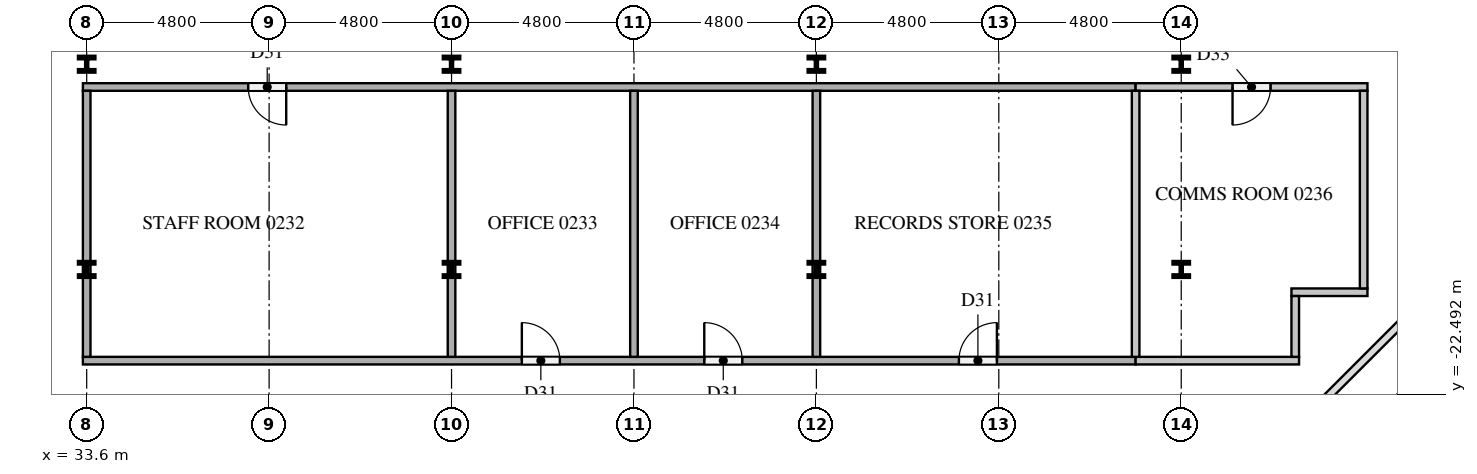
"""IFC4 building model, lengths in metres.
Left out: names, types, materials, properties, quantities, classifications, styles, units other than length and angle.
Written with IfcOpenShell. Run it as: python <this file> out.ifc"""

import sys

from ifc_helpers import new_model, si_unit, direction, frame, frame_2d, origin, origin_2d, place, context, subcontext, project, spatial, rectangle, i_section, extrude, element, fill, save


model = new_model("IFC4")
c1 = context("Model", 3, precision=1e-05, world=origin(), true_north=direction((0.0, 1.0)))
c2 = subcontext(c1, "Body", "Model", "MODEL_VIEW")
j1 = project(units=[si_unit("LENGTHUNIT", "METRE"), si_unit("PLANEANGLEUNIT", "RADIAN")], contexts=[c1])
p1 = place(None, origin())
s1 = spatial("IfcSite", under=j1, at=p1, CompositionType="ELEMENT")
p2 = place(p1, origin())
s2 = spatial("IfcBuilding", under=s1, at=p2, CompositionType="ELEMENT")
p3 = place(p2, frame((0.0, 0.0, 10.5)))
s3 = spatial("IfcBuildingStorey", under=s2, at=p3, CompositionType="ELEMENT", Elevation=10.5)
for number, where, z_axis, x_axis in (
    (1, (33.6, -19.2, 0.0), (0.0, 0.0, 1.0), (1.0, 0.0, 0.0)),
    (2, (33.6, -13.8, 0.0), (0.0, 0.0, 1.0), (1.0, 0.0, 0.0)),
    (3, (43.2, -19.2, 0.0), (0.0, 0.0, 1.0), (1.0, 0.0, 0.0)),
    (4, (43.2, -13.8, 0.0), (0.0, 0.0, 1.0), (1.0, 0.0, 0.0)),
    (5, (52.8, -19.2, 0.0), (0.0, 0.0, 1.0), (1.0, 0.0, 0.0)),
    (6, (52.8, -13.8, 0.0), (0.0, 0.0, 1.0), (1.0, 0.0, 0.0)),
    (7, (62.4, -19.2, 0.0), (0.0, 0.0, 1.0), (1.0, 0.0, 0.0)),
    (8, (62.4, -13.8, 0.0), (0.0, 0.0, 1.0), (1.0, 0.0, 0.0)),
):
    element("IfcColumn", number, at=place(p3, frame(where, z_axis=z_axis, x_axis=x_axis)), inside=s3, PredefinedType="COLUMN", context=c2, shape_type="SweptSolid", body=[
        extrude(i_section(OverallWidth=0.396, OverallDepth=0.381, WebThickness=0.019, FlangeThickness=0.03, at=origin_2d()), origin(), (0.0, 0.0, 1.0), 4.2),
    ])
p4 = place(p3, frame((33.5, -21.6, 0.0), z_axis=(0.0, 0.0, 1.0), x_axis=(1.0, 0.0, 0.0)))
e9 = element("IfcWall", 9, at=p4, inside=s3, PredefinedType="PARTITIONING", context=c2, shape_type="SweptSolid", body=[
    extrude(rectangle(XDim=27.7, YDim=0.2, at=frame_2d((13.85, 0.0))), origin(), (0.0, 0.0, 1.0), 4.2),
])
p5 = place(p4, frame((11.55, 0.0, 0.0)))
e10 = element("IfcOpeningElement", 10, at=p5, cuts=e9, PredefinedType="OPENING", context=c2, shape_type="SweptSolid", body=[
    extrude(rectangle(XDim=1.0, YDim=2.1, at=frame_2d((0.5, 1.05))), frame((0.0, 0.11, 0.0), z_axis=(0.0, -1.0, 0.0), x_axis=(1.0, 0.0, 0.0)), (0.0, 0.0, 1.0), 0.22),
])
p6 = place(p4, frame((16.35, 0.0, 0.0)))
e11 = element("IfcOpeningElement", 11, at=p6, cuts=e9, PredefinedType="OPENING", context=c2, shape_type="SweptSolid", body=[
    extrude(rectangle(XDim=1.0, YDim=2.1, at=frame_2d((0.5, 1.05))), frame((0.0, 0.11, 0.0), z_axis=(0.0, -1.0, 0.0), x_axis=(1.0, 0.0, 0.0)), (0.0, 0.0, 1.0), 0.22),
])
p7 = place(p4, frame((23.05, 0.0, 0.0)))
e12 = element("IfcOpeningElement", 12, at=p7, cuts=e9, PredefinedType="OPENING", context=c2, shape_type="SweptSolid", body=[
    extrude(rectangle(XDim=1.0, YDim=2.1, at=frame_2d((0.5, 1.05))), frame((0.0, 0.11, 0.0), z_axis=(0.0, -1.0, 0.0), x_axis=(1.0, 0.0, 0.0)), (0.0, 0.0, 1.0), 0.22),
])
p8 = place(p3, frame((61.2, -21.6, 0.0), z_axis=(0.0, 0.0, 1.0), x_axis=(1.0, 0.0, 0.0)))
e13 = element("IfcWall", 13, at=p8, inside=s3, PredefinedType="PARTITIONING", context=c2, shape_type="SweptSolid", body=[
    extrude(rectangle(XDim=4.3, YDim=0.2, at=frame_2d((2.15, 0.0))), origin(), (0.0, 0.0, 1.0), 4.2),
])
p9 = place(p3, frame((65.3, -19.8, 0.0), z_axis=(0.0, 0.0, 1.0), x_axis=(1.0, 0.0, 0.0)))
e14 = element("IfcWall", 14, at=p9, inside=s3, PredefinedType="PARTITIONING", context=c2, shape_type="SweptSolid", body=[
    extrude(rectangle(XDim=2.0, YDim=0.2, at=frame_2d((1.0, 0.0))), origin(), (0.0, 0.0, 1.0), 4.2),
])
p10 = place(p3, frame((61.2, -14.4, 0.0), z_axis=(0.0, 0.0, 1.0), x_axis=(-1.0, 0.0, 0.0)))
e15 = element("IfcWall", 15, at=p10, inside=s3, PredefinedType="PARTITIONING", context=c2, shape_type="SweptSolid", body=[
    extrude(rectangle(XDim=27.7, YDim=0.2, at=frame_2d((13.85, 0.0))), origin(), (0.0, 0.0, 1.0), 4.2),
])
p11 = place(p10, frame((22.35, 0.0, 0.0)))
e16 = element("IfcOpeningElement", 16, at=p11, cuts=e15, PredefinedType="OPENING", context=c2, shape_type="SweptSolid", body=[
    extrude(rectangle(XDim=1.0, YDim=2.1, at=frame_2d((0.5, 1.05))), frame((0.0, 0.11, 0.0), z_axis=(0.0, -1.0, 0.0), x_axis=(1.0, 0.0, 0.0)), (0.0, 0.0, 1.0), 0.22),
])
p12 = place(p3, frame((67.3, -14.4, 0.0), z_axis=(0.0, 0.0, 1.0), x_axis=(-1.0, 0.0, 0.0)))
e17 = element("IfcWall", 17, at=p12, inside=s3, PredefinedType="PARTITIONING", context=c2, shape_type="SweptSolid", body=[
    extrude(rectangle(XDim=6.1, YDim=0.2, at=frame_2d((3.05, 0.0))), origin(), (0.0, 0.0, 1.0), 4.2),
])
p13 = place(p12, frame((2.55, 0.0, 0.0)))
e18 = element("IfcOpeningElement", 18, at=p13, cuts=e17, PredefinedType="OPENING", context=c2, shape_type="SweptSolid", body=[
    extrude(rectangle(XDim=1.0, YDim=2.1, at=frame_2d((0.5, 1.05))), frame((0.0, 0.11, 0.0), z_axis=(0.0, -1.0, 0.0), x_axis=(1.0, 0.0, 0.0)), (0.0, 0.0, 1.0), 0.22),
])
for number, where, z_axis, x_axis in (
    (19, (33.6, -21.5, 0.0), (0.0, 0.0, 1.0), (0.0, 1.0, 0.0)),
    (20, (43.2, -21.5, 0.0), (0.0, 0.0, 1.0), (0.0, 1.0, 0.0)),
    (21, (48.0, -21.5, 0.0), (0.0, 0.0, 1.0), (0.0, 1.0, 0.0)),
    (22, (52.8, -21.5, 0.0), (0.0, 0.0, 1.0), (0.0, 1.0, 0.0)),
    (23, (61.2, -21.5, 0.0), (0.0, 0.0, 1.0), (0.0, 1.0, 0.0)),
):
    element("IfcWall", number, at=place(p3, frame(where, z_axis=z_axis, x_axis=x_axis)), inside=s3, PredefinedType="PARTITIONING", context=c2, shape_type="SweptSolid", body=[
        extrude(rectangle(XDim=7.0, YDim=0.2, at=frame_2d((3.5, 0.0))), origin(), (0.0, 0.0, 1.0), 4.2),
    ])
p14 = place(p3, frame((65.4, -21.5, 0.0), z_axis=(0.0, 0.0, 1.0), x_axis=(0.0, 1.0, 0.0)))
e24 = element("IfcWall", 24, at=p14, inside=s3, PredefinedType="PARTITIONING", context=c2, shape_type="SweptSolid", body=[
    extrude(rectangle(XDim=1.6, YDim=0.2, at=frame_2d((0.8, 0.0))), origin(), (0.0, 0.0, 1.0), 4.2),
])
p15 = place(p3, frame((67.2, -19.7, 0.0), z_axis=(0.0, 0.0, 1.0), x_axis=(0.0, 1.0, 0.0)))
e25 = element("IfcWall", 25, at=p15, inside=s3, PredefinedType="PARTITIONING", context=c2, shape_type="SweptSolid", body=[
    extrude(rectangle(XDim=5.2, YDim=0.2, at=frame_2d((2.6, 0.0))), origin(), (0.0, 0.0, 1.0), 4.2),
])
p16 = place(p11, origin())
e26 = element("IfcDoor", 26, at=p16, inside=s3, OperationType="SINGLE_SWING_LEFT", PredefinedType="DOOR", context=c2, shape_type="SweptSolid", body=[
    extrude(rectangle(XDim=1.0, YDim=2.1, at=frame_2d((0.5, 1.05))), frame((0.0, 0.025, 0.0), z_axis=(0.0, -1.0, 0.0), x_axis=(1.0, 0.0, 0.0)), (0.0, 0.0, 1.0), 0.05),
])
fill(e16, e26)
p17 = place(p5, origin())
e27 = element("IfcDoor", 27, at=p17, inside=s3, OperationType="SINGLE_SWING_LEFT", PredefinedType="DOOR", context=c2, shape_type="SweptSolid", body=[
    extrude(rectangle(XDim=1.0, YDim=2.1, at=frame_2d((0.5, 1.05))), frame((0.0, 0.025, 0.0), z_axis=(0.0, -1.0, 0.0), x_axis=(1.0, 0.0, 0.0)), (0.0, 0.0, 1.0), 0.05),
])
fill(e10, e27)
p18 = place(p6, origin())
e28 = element("IfcDoor", 28, at=p18, inside=s3, OperationType="SINGLE_SWING_LEFT", PredefinedType="DOOR", context=c2, shape_type="SweptSolid", body=[
    extrude(rectangle(XDim=1.0, YDim=2.1, at=frame_2d((0.5, 1.05))), frame((0.0, 0.025, 0.0), z_axis=(0.0, -1.0, 0.0), x_axis=(1.0, 0.0, 0.0)), (0.0, 0.0, 1.0), 0.05),
])
fill(e11, e28)
p19 = place(p7, origin())
e29 = element("IfcDoor", 29, at=p19, inside=s3, OperationType="SINGLE_SWING_RIGHT", PredefinedType="DOOR", context=c2, shape_type="SweptSolid", body=[
    extrude(rectangle(XDim=1.0, YDim=2.1, at=frame_2d((0.5, 1.05))), frame((0.0, 0.025, 0.0), z_axis=(0.0, -1.0, 0.0), x_axis=(1.0, 0.0, 0.0)), (0.0, 0.0, 1.0), 0.05),
])
fill(e12, e29)
p20 = place(p13, origin())
e30 = element("IfcDoor", 30, at=p20, inside=s3, OperationType="SINGLE_SWING_RIGHT", PredefinedType="DOOR", context=c2, shape_type="SweptSolid", body=[
    extrude(rectangle(XDim=1.0, YDim=2.1, at=frame_2d((0.5, 1.05))), frame((0.0, 0.025, 0.0), z_axis=(0.0, -1.0, 0.0), x_axis=(1.0, 0.0, 0.0)), (0.0, 0.0, 1.0), 0.05),
])
fill(e18, e30)
save(model, sys.argv[1])
